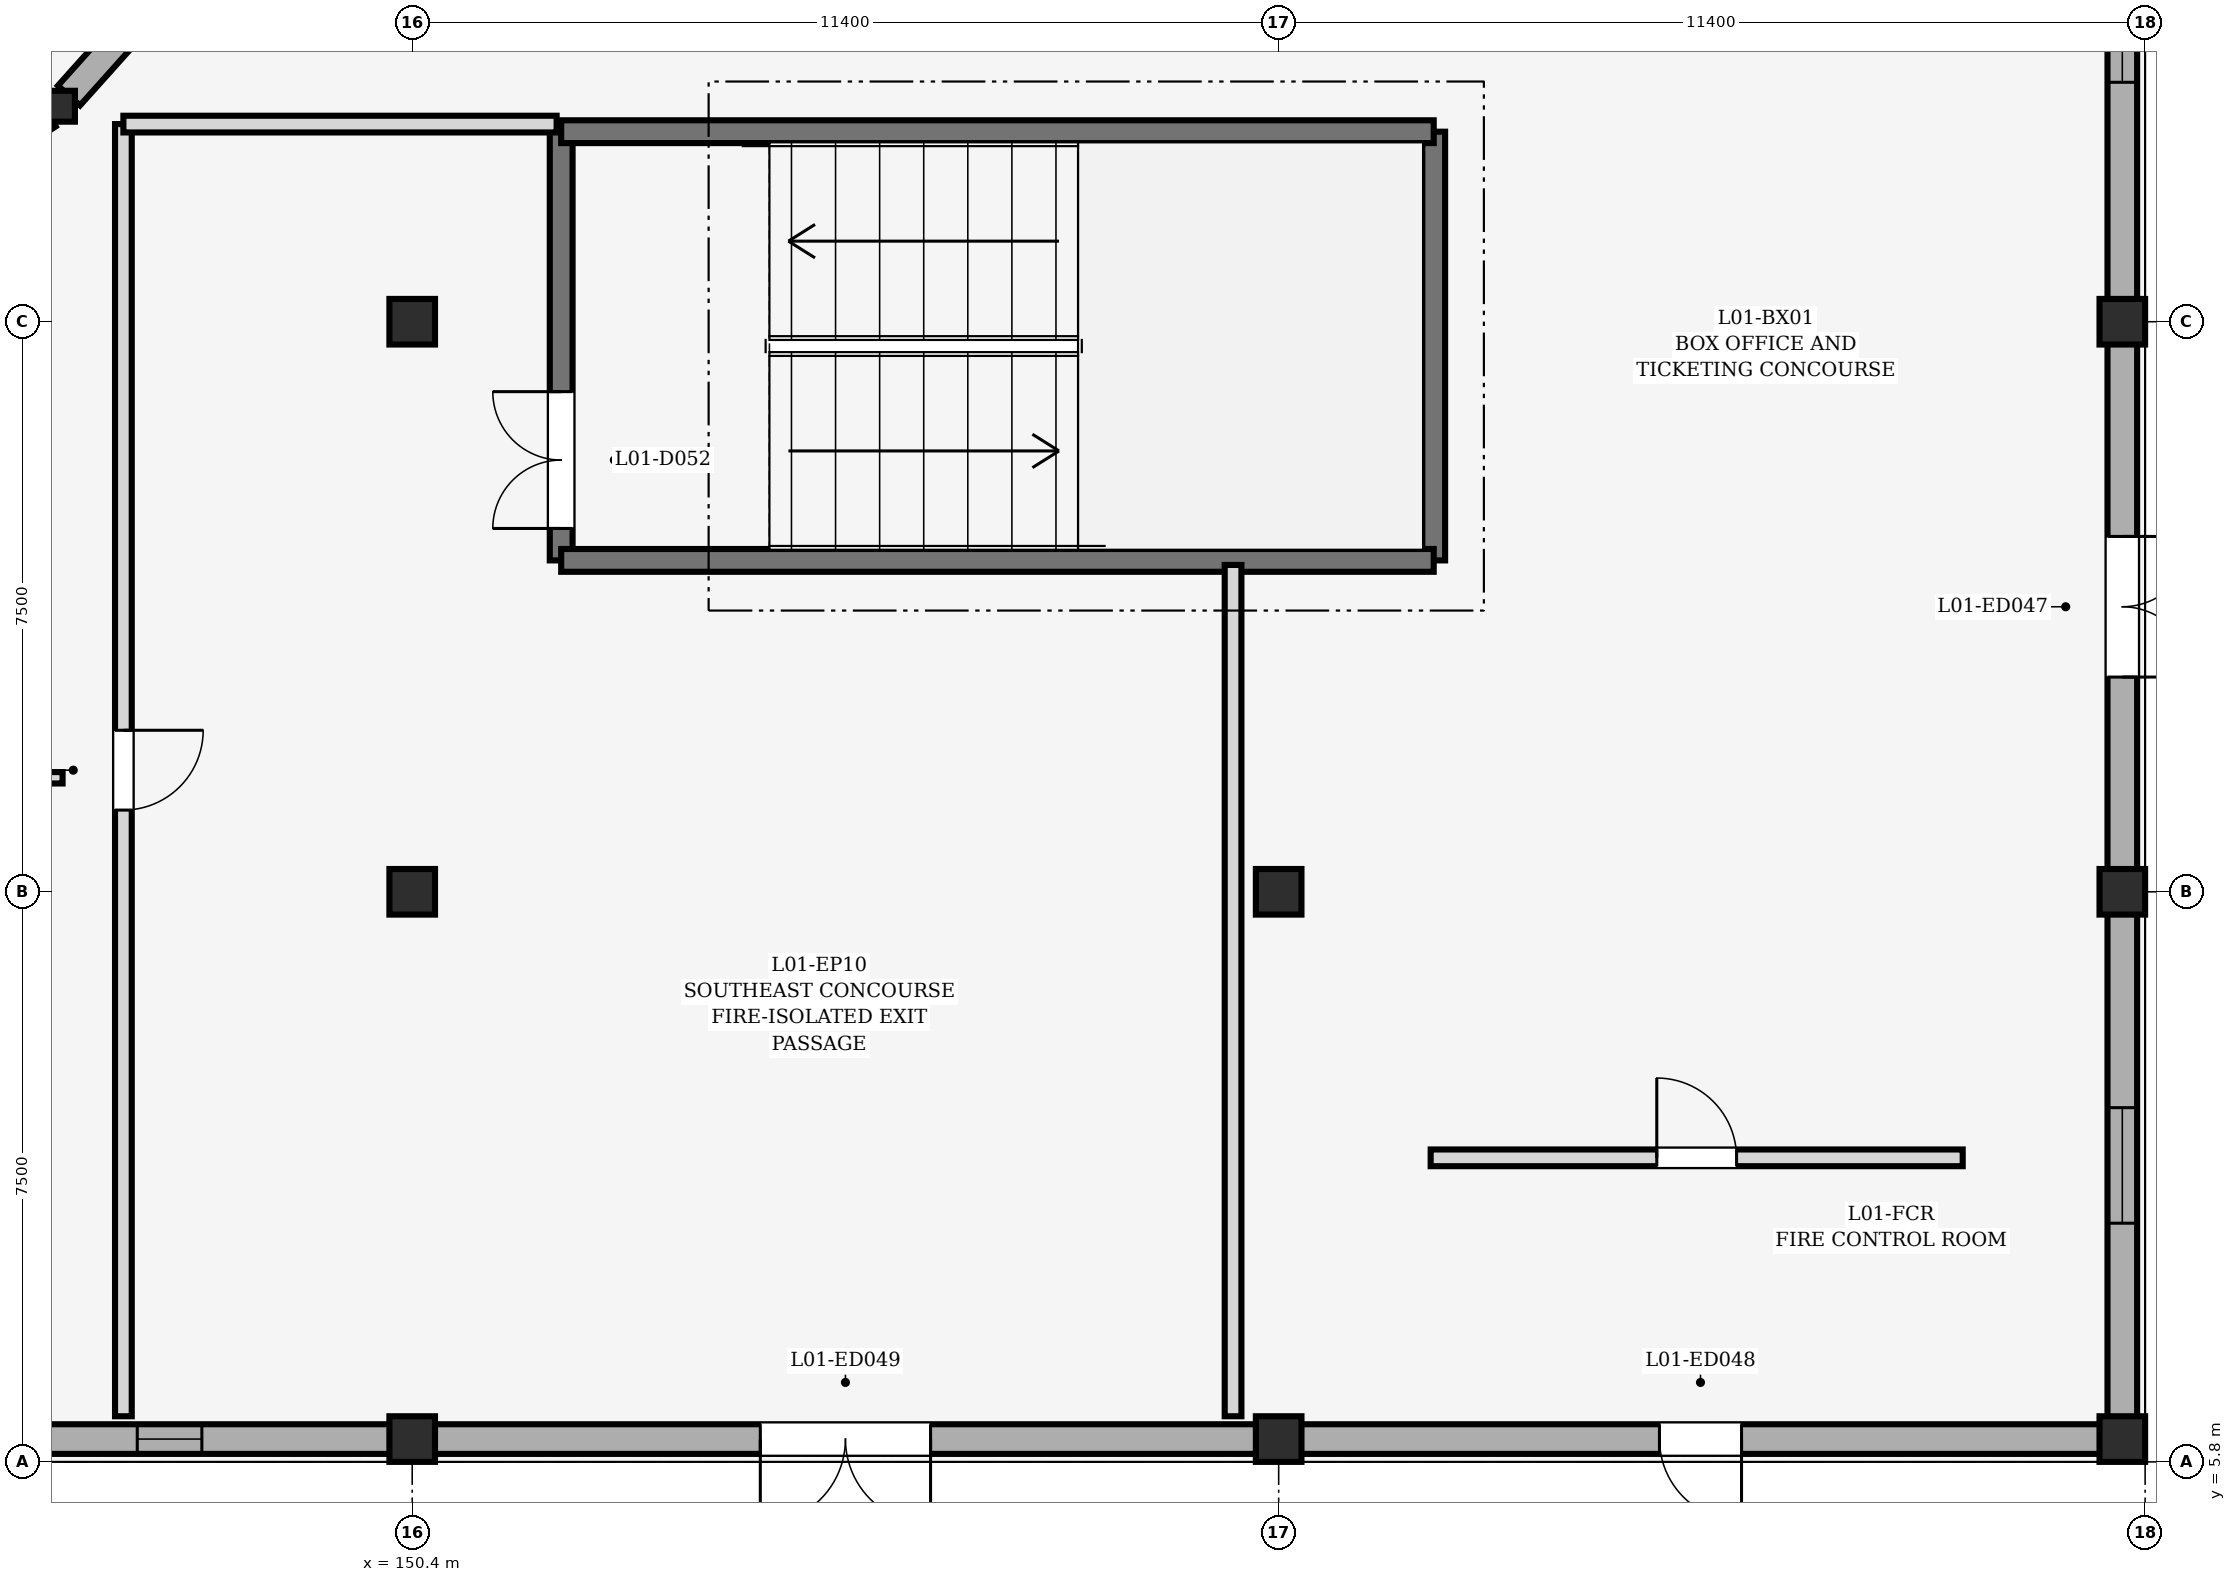
"""IFC4 building model, lengths in metres.
Left out: names, types, materials, properties, quantities, classifications, styles, units other than length and angle.
Written with IfcOpenShell. Run it as: python <this file> out.ifc"""

import sys

from ifc_helpers import new_model, si_unit, direction, frame, frame_2d, origin, origin_2d, place, context, subcontext, project, spatial, rectangle, hollow_circle, extrude, element, fill, save


model = new_model("IFC4")
c1 = context("Model", 3, precision=1e-05, world=origin(), true_north=direction((0.0, 1.0)))
c2 = subcontext(c1, "Body", "Model", "MODEL_VIEW")
j1 = project(units=[si_unit("LENGTHUNIT", "METRE"), si_unit("PLANEANGLEUNIT", "RADIAN")], contexts=[c1])
p1 = place(None, origin())
s1 = spatial("IfcSite", under=j1, at=p1, CompositionType="ELEMENT")
p2 = place(p1, origin())
s2 = spatial("IfcBuilding", under=s1, at=p2, CompositionType="ELEMENT")
p3 = place(p2, origin())
s3 = spatial("IfcBuildingStorey", under=s2, at=p3, CompositionType="ELEMENT", Elevation=0.0)
p4 = place(p3, frame((145.759, 23.635, 0.0), z_axis=(0.0, 0.0, 1.0), x_axis=(1.0, 0.0, 0.0)))
e1 = element("IfcColumn", 1, at=p4, inside=s3, PredefinedType="COLUMN", context=c2, shape_type="SweptSolid", body=[
    extrude(hollow_circle(Radius=0.203, WallThickness=0.016, at=origin_2d()), origin(), (0.0, 0.0, 1.0), 5.4),
])
for number, where, z_axis, x_axis in (
    (2, (150.4, 6.1, 0.0), (0.0, 0.0, 1.0), (1.0, 0.0, 0.0)),
    (3, (150.4, 13.3, 0.0), (0.0, 0.0, 1.0), (1.0, 0.0, 0.0)),
    (4, (150.4, 20.8, 0.0), (0.0, 0.0, 1.0), (1.0, 0.0, 0.0)),
    (5, (161.8, 6.1, 0.0), (0.0, 0.0, 1.0), (1.0, 0.0, 0.0)),
    (6, (161.8, 13.3, 0.0), (0.0, 0.0, 1.0), (1.0, 0.0, 0.0)),
    (7, (172.9, 6.1, 0.0), (0.0, 0.0, 1.0), (1.0, 0.0, 0.0)),
    (8, (172.9, 13.3, 0.0), (0.0, 0.0, 1.0), (1.0, 0.0, 0.0)),
    (9, (172.9, 20.8, 0.0), (0.0, 0.0, 1.0), (1.0, 0.0, 0.0)),
):
    element("IfcColumn", number, at=place(p3, frame(where, z_axis=z_axis, x_axis=x_axis)), inside=s3, PredefinedType="COLUMN", context=c2, shape_type="SweptSolid", body=[
        extrude(rectangle(XDim=0.6, YDim=0.6, at=origin_2d()), origin(), (0.0, 0.0, 1.0), 5.4),
    ])
p5 = place(p3, frame((138.957, 19.162, 0.0), z_axis=(0.0, 0.0, 1.0), x_axis=(0.835481991605, 0.549517826556, 0.0)))
e10 = element("IfcWall", 10, at=p5, inside=s3, PredefinedType="STANDARD", context=c2, shape_type="SweptSolid", body=[
    extrude(rectangle(XDim=7.953, YDim=0.39, at=frame_2d((3.976, 0.0))), origin(), (0.0, 0.0, 1.0), 4.487),
])
p6 = place(p5, frame((2.856, 0.0, 0.0)))
e11 = element("IfcOpeningElement", 11, at=p6, cuts=e10, PredefinedType="OPENING", context=c2, shape_type="SweptSolid", body=[
    extrude(rectangle(XDim=2.24, YDim=2.35, at=frame_2d((1.12, 1.175))), frame((0.0, 0.207, 0.0), z_axis=(0.0, -1.0, 0.0), x_axis=(1.0, 0.0, 0.0)), (0.0, 0.0, 1.0), 0.414),
])
p7 = place(p3, frame((145.884, 23.775, 0.0), z_axis=(0.0, 0.0, 1.0), x_axis=(0.666987529742, 0.745068879479, 0.0)))
e12 = element("IfcWall", 12, at=p7, inside=s3, PredefinedType="STANDARD", context=c2, shape_type="SweptSolid", body=[
    extrude(rectangle(XDim=7.629, YDim=0.39, at=frame_2d((3.814, 0.0))), origin(), (0.0, 0.0, 1.0), 4.487),
])
p8 = place(p7, frame((2.695, 0.0, 0.0)))
e13 = element("IfcOpeningElement", 13, at=p8, cuts=e12, PredefinedType="OPENING", context=c2, shape_type="SweptSolid", body=[
    extrude(rectangle(XDim=2.24, YDim=2.35, at=frame_2d((1.12, 1.175))), frame((0.0, 0.207, 0.0), z_axis=(0.0, -1.0, 0.0), x_axis=(1.0, 0.0, 0.0)), (0.0, 0.0, 1.0), 0.414),
])
p9 = place(p3, frame((172.9, 13.015, 0.0), z_axis=(0.0, 0.0, 1.0), x_axis=(0.0, -1.0, 0.0)))
e14 = element("IfcWall", 14, at=p9, inside=s3, PredefinedType="STANDARD", context=c2, shape_type="SweptSolid", body=[
    extrude(rectangle(XDim=6.63, YDim=0.39, at=frame_2d((3.315, 0.0))), origin(), (0.0, 0.0, 1.0), 4.427),
])
p10 = place(p9, frame((2.555, 0.0, 0.85)))
e15 = element("IfcOpeningElement", 15, at=p10, cuts=e14, PredefinedType="OPENING", context=c2, shape_type="SweptSolid", body=[
    extrude(rectangle(XDim=1.52, YDim=1.75, at=frame_2d((0.76, 0.875))), frame((0.0, 0.207, 0.0), z_axis=(0.0, -1.0, 0.0), x_axis=(1.0, 0.0, 0.0)), (0.0, 0.0, 1.0), 0.414),
])
p11 = place(p3, frame((172.9, 20.515, 0.0), z_axis=(0.0, 0.0, 1.0), x_axis=(0.0, -1.0, 0.0)))
e16 = element("IfcWall", 16, at=p11, inside=s3, PredefinedType="STANDARD", context=c2, shape_type="SweptSolid", body=[
    extrude(rectangle(XDim=6.93, YDim=0.39, at=frame_2d((3.465, 0.0))), origin(), (0.0, 0.0, 1.0), 4.525),
])
p12 = place(p11, frame((2.54, 0.0, 0.0)))
e17 = element("IfcOpeningElement", 17, at=p12, cuts=e16, PredefinedType="OPENING", context=c2, shape_type="SweptSolid", body=[
    extrude(rectangle(XDim=1.85, YDim=2.25, at=frame_2d((0.925, 1.125))), frame((0.0, 0.207, 0.0), z_axis=(0.0, -1.0, 0.0), x_axis=(1.0, 0.0, 0.0)), (0.0, 0.0, 1.0), 0.414),
])
p13 = place(p3, frame((172.9, 27.715, 0.0), z_axis=(0.0, 0.0, 1.0), x_axis=(0.0, -1.0, 0.0)))
e18 = element("IfcWall", 18, at=p13, inside=s3, PredefinedType="STANDARD", context=c2, shape_type="SweptSolid", body=[
    extrude(rectangle(XDim=6.63, YDim=0.39, at=frame_2d((3.315, 0.0))), origin(), (0.0, 0.0, 1.0), 4.599),
])
p14 = place(p13, frame((2.865, 0.0, 0.85)))
e19 = element("IfcOpeningElement", 19, at=p14, cuts=e18, PredefinedType="OPENING", context=c2, shape_type="SweptSolid", body=[
    extrude(rectangle(XDim=0.9, YDim=1.5, at=frame_2d((0.45, 0.75))), frame((0.0, 0.207, 0.0), z_axis=(0.0, -1.0, 0.0), x_axis=(1.0, 0.0, 0.0)), (0.0, 0.0, 1.0), 0.414),
])
p15 = place(p3, frame((172.615, 6.1, 0.0), z_axis=(0.0, 0.0, 1.0), x_axis=(-1.0, 0.0, 0.0)))
e20 = element("IfcWall", 20, at=p15, inside=s3, PredefinedType="STANDARD", context=c2, shape_type="SweptSolid", body=[
    extrude(rectangle(XDim=10.53, YDim=0.39, at=frame_2d((5.265, 0.0))), origin(), (0.0, 0.0, 1.0), 4.427),
])
p16 = place(p15, frame((4.725, 0.0, 0.0)))
e21 = element("IfcOpeningElement", 21, at=p16, cuts=e20, PredefinedType="OPENING", context=c2, shape_type="SweptSolid", body=[
    extrude(rectangle(XDim=1.08, YDim=2.18, at=frame_2d((0.54, 1.09))), frame((0.0, 0.207, 0.0), z_axis=(0.0, -1.0, 0.0), x_axis=(1.0, 0.0, 0.0)), (0.0, 0.0, 1.0), 0.414),
])
p17 = place(p3, frame((161.515, 6.1, 0.0), z_axis=(0.0, 0.0, 1.0), x_axis=(-1.0, 0.0, 0.0)))
e22 = element("IfcWall", 22, at=p17, inside=s3, PredefinedType="STANDARD", context=c2, shape_type="SweptSolid", body=[
    extrude(rectangle(XDim=10.83, YDim=0.39, at=frame_2d((5.415, 0.0))), origin(), (0.0, 0.0, 1.0), 4.427),
])
p18 = place(p17, frame((4.295, 0.0, 0.0)))
e23 = element("IfcOpeningElement", 23, at=p18, cuts=e22, PredefinedType="OPENING", context=c2, shape_type="SweptSolid", body=[
    extrude(rectangle(XDim=2.24, YDim=2.35, at=frame_2d((1.12, 1.175))), frame((0.0, 0.207, 0.0), z_axis=(0.0, -1.0, 0.0), x_axis=(1.0, 0.0, 0.0)), (0.0, 0.0, 1.0), 0.414),
])
p19 = place(p3, frame((150.115, 6.1, 0.0), z_axis=(0.0, 0.0, 1.0), x_axis=(-1.0, 0.0, 0.0)))
e24 = element("IfcWall", 24, at=p19, inside=s3, PredefinedType="STANDARD", context=c2, shape_type="SweptSolid", body=[
    extrude(rectangle(XDim=10.23, YDim=0.39, at=frame_2d((5.115, 0.0))), origin(), (0.0, 0.0, 1.0), 4.427),
])
p20 = place(p19, frame((2.482, 0.0, 0.85)))
e25 = element("IfcOpeningElement", 25, at=p20, cuts=e24, PredefinedType="OPENING", context=c2, shape_type="SweptSolid", body=[
    extrude(rectangle(XDim=0.85, YDim=2.2, at=frame_2d((0.425, 1.1))), frame((0.0, 0.207, 0.0), z_axis=(0.0, -1.0, 0.0), x_axis=(1.0, 0.0, 0.0)), (0.0, 0.0, 1.0), 0.414),
])
p21 = place(p19, frame((6.897, 0.0, 0.85)))
e26 = element("IfcOpeningElement", 26, at=p21, cuts=e24, PredefinedType="OPENING", context=c2, shape_type="SweptSolid", body=[
    extrude(rectangle(XDim=0.85, YDim=2.2, at=frame_2d((0.425, 1.1))), frame((0.0, 0.207, 0.0), z_axis=(0.0, -1.0, 0.0), x_axis=(1.0, 0.0, 0.0)), (0.0, 0.0, 1.0), 0.414),
])
p22 = place(p3, frame((152.36, 17.66, 0.0), z_axis=(0.0, 0.0, 1.0), x_axis=(0.0, 1.0, 0.0)))
e27 = element("IfcWall", 27, at=p22, inside=s3, PredefinedType="SHEAR", context=c2, shape_type="SweptSolid", body=[
    extrude(rectangle(XDim=5.64, YDim=0.3, at=frame_2d((2.82, 0.0))), origin(), (0.0, 0.0, 1.0), 5.14),
])
p23 = place(p22, frame((0.42, 0.0, 0.0)))
e28 = element("IfcOpeningElement", 28, at=p23, cuts=e27, PredefinedType="OPENING", context=c2, shape_type="SweptSolid", body=[
    extrude(rectangle(XDim=1.8, YDim=2.2, at=frame_2d((0.9, 1.1))), frame((0.0, 0.162, 0.0), z_axis=(0.0, -1.0, 0.0), x_axis=(1.0, 0.0, 0.0)), (0.0, 0.0, 1.0), 0.324),
])
p24 = place(p3, frame((163.84, 23.3, 0.0), z_axis=(0.0, 0.0, 1.0), x_axis=(0.0, -1.0, 0.0)))
e29 = element("IfcWall", 29, at=p24, inside=s3, PredefinedType="SHEAR", context=c2, shape_type="SweptSolid", body=[
    extrude(rectangle(XDim=5.64, YDim=0.3, at=frame_2d((2.82, 0.0))), origin(), (0.0, 0.0, 1.0), 5.14),
])
for number, where, z_axis, x_axis in (
    (30, (163.84, 17.66, 0.0), (0.0, 0.0, 1.0), (-1.0, 0.0, 0.0)),
    (31, (152.36, 23.3, 0.0), (0.0, 0.0, 1.0), (1.0, 0.0, 0.0)),
):
    element("IfcWall", number, at=place(p3, frame(where, z_axis=z_axis, x_axis=x_axis)), inside=s3, PredefinedType="SHEAR", context=c2, shape_type="SweptSolid", body=[
        extrude(rectangle(XDim=11.48, YDim=0.3, at=frame_2d((5.74, 0.0))), origin(), (0.0, 0.0, 1.0), 5.14),
    ])
p25 = place(p3, frame((146.6, 23.4, 0.0), z_axis=(0.0, 0.0, 1.0), x_axis=(0.0, -1.0, 0.0)))
e32 = element("IfcWall", 32, at=p25, inside=s3, PredefinedType="SOLIDWALL", context=c2, shape_type="SweptSolid", body=[
    extrude(rectangle(XDim=17.0, YDim=0.22, at=frame_2d((8.5, 0.0))), origin(), (0.0, 0.0, 1.0), 5.125),
])
p26 = place(p25, frame((7.975, 0.0, 0.0)))
e33 = element("IfcOpeningElement", 33, at=p26, cuts=e32, PredefinedType="OPENING", context=c2, shape_type="SweptSolid", body=[
    extrude(rectangle(XDim=1.05, YDim=2.15, at=frame_2d((0.525, 1.075))), frame((0.0, 0.122, 0.0), z_axis=(0.0, -1.0, 0.0), x_axis=(1.0, 0.0, 0.0)), (0.0, 0.0, 1.0), 0.244),
])
p27 = place(p3, frame((152.3, 23.4, 0.0), z_axis=(0.0, 0.0, 1.0), x_axis=(-1.0, 0.0, 0.0)))
e34 = element("IfcWall", 34, at=p27, inside=s3, PredefinedType="SOLIDWALL", context=c2, shape_type="SweptSolid", body=[
    extrude(rectangle(XDim=5.7, YDim=0.22, at=frame_2d((2.85, 0.0))), origin(), (0.0, 0.0, 1.0), 5.125),
])
p28 = place(p3, frame((161.2, 6.4, 0.0), z_axis=(0.0, 0.0, 1.0), x_axis=(0.0, 1.0, 0.0)))
e35 = element("IfcWall", 35, at=p28, inside=s3, PredefinedType="SOLIDWALL", context=c2, shape_type="SweptSolid", body=[
    extrude(rectangle(XDim=11.2, YDim=0.22, at=frame_2d((5.6, 0.0))), origin(), (0.0, 0.0, 1.0), 5.125),
])
p29 = place(p3, frame((140.4, 14.8, 0.0), z_axis=(0.0, 0.0, 1.0), x_axis=(1.0, 0.0, 0.0)))
e36 = element("IfcWall", 36, at=p29, inside=s3, PredefinedType="PARTITIONING", context=c2, shape_type="SweptSolid", body=[
    extrude(rectangle(XDim=5.4, YDim=0.15, at=frame_2d((2.7, 0.0))), origin(), (0.0, 0.0, 1.0), 5.125),
])
p30 = place(p29, frame((1.85, 0.0, 0.0)))
e37 = element("IfcOpeningElement", 37, at=p30, cuts=e36, PredefinedType="OPENING", context=c2, shape_type="SweptSolid", body=[
    extrude(rectangle(XDim=1.7, YDim=2.2, at=frame_2d((0.85, 1.1))), frame((0.0, 0.087, 0.0), z_axis=(0.0, -1.0, 0.0), x_axis=(1.0, 0.0, 0.0)), (0.0, 0.0, 1.0), 0.174),
])
p31 = place(p3, frame((163.8, 9.8, 0.0), z_axis=(0.0, 0.0, 1.0), x_axis=(1.0, 0.0, 0.0)))
e38 = element("IfcWall", 38, at=p31, inside=s3, PredefinedType="SOLIDWALL", context=c2, shape_type="SweptSolid", body=[
    extrude(rectangle(XDim=7.0, YDim=0.22, at=frame_2d((3.5, 0.0))), origin(), (0.0, 0.0, 1.0), 4.724),
])
p32 = place(p31, frame((2.975, 0.0, 0.0)))
e39 = element("IfcOpeningElement", 39, at=p32, cuts=e38, PredefinedType="OPENING", context=c2, shape_type="SweptSolid", body=[
    extrude(rectangle(XDim=1.05, YDim=2.15, at=frame_2d((0.525, 1.075))), frame((0.0, 0.122, 0.0), z_axis=(0.0, -1.0, 0.0), x_axis=(1.0, 0.0, 0.0)), (0.0, 0.0, 1.0), 0.244),
])
p33 = place(p10, origin())
e40 = element("IfcWindow", 40, at=p33, inside=s3, PartitioningType="DOUBLE_PANEL_VERTICAL", PredefinedType="WINDOW", context=c2, shape_type="SweptSolid", body=[
    extrude(rectangle(XDim=1.52, YDim=1.75, at=frame_2d((0.76, 0.875))), frame((0.0, 0.03, 0.0), z_axis=(0.0, -1.0, 0.0), x_axis=(1.0, 0.0, 0.0)), (0.0, 0.0, 1.0), 0.06),
])
fill(e15, e40)
p34 = place(p12, origin())
e41 = element("IfcDoor", 41, at=p34, inside=s3, OperationType="DOUBLE_DOOR_SINGLE_SWING", PredefinedType="DOOR", context=c2, shape_type="SweptSolid", body=[
    extrude(rectangle(XDim=1.85, YDim=2.25, at=frame_2d((0.925, 1.125))), frame((0.0, 0.025, 0.0), z_axis=(0.0, -1.0, 0.0), x_axis=(1.0, 0.0, 0.0)), (0.0, 0.0, 1.0), 0.05),
])
fill(e17, e41)
p35 = place(p14, origin())
e42 = element("IfcWindow", 42, at=p35, inside=s3, PartitioningType="DOUBLE_PANEL_VERTICAL", PredefinedType="WINDOW", context=c2, shape_type="SweptSolid", body=[
    extrude(rectangle(XDim=0.9, YDim=1.5, at=frame_2d((0.45, 0.75))), frame((0.0, 0.03, 0.0), z_axis=(0.0, -1.0, 0.0), x_axis=(1.0, 0.0, 0.0)), (0.0, 0.0, 1.0), 0.06),
])
fill(e19, e42)
p36 = place(p16, origin())
e43 = element("IfcDoor", 43, at=p36, inside=s3, OperationType="SINGLE_SWING_LEFT", PredefinedType="DOOR", context=c2, shape_type="SweptSolid", body=[
    extrude(rectangle(XDim=1.08, YDim=2.18, at=frame_2d((0.54, 1.09))), frame((0.0, 0.025, 0.0), z_axis=(0.0, -1.0, 0.0), x_axis=(1.0, 0.0, 0.0)), (0.0, 0.0, 1.0), 0.05),
])
fill(e21, e43)
p37 = place(p18, origin())
e44 = element("IfcDoor", 44, at=p37, inside=s3, OperationType="DOUBLE_DOOR_SINGLE_SWING", PredefinedType="DOOR", context=c2, shape_type="SweptSolid", body=[
    extrude(rectangle(XDim=2.24, YDim=2.35, at=frame_2d((1.12, 1.175))), frame((0.0, 0.025, 0.0), z_axis=(0.0, -1.0, 0.0), x_axis=(1.0, 0.0, 0.0)), (0.0, 0.0, 1.0), 0.05),
])
fill(e23, e44)
p38 = place(p20, origin())
e45 = element("IfcWindow", 45, at=p38, inside=s3, PartitioningType="DOUBLE_PANEL_VERTICAL", PredefinedType="WINDOW", context=c2, shape_type="SweptSolid", body=[
    extrude(rectangle(XDim=0.85, YDim=2.2, at=frame_2d((0.425, 1.1))), frame((0.0, 0.03, 0.0), z_axis=(0.0, -1.0, 0.0), x_axis=(1.0, 0.0, 0.0)), (0.0, 0.0, 1.0), 0.06),
])
fill(e25, e45)
p39 = place(p23, origin())
e46 = element("IfcDoor", 46, at=p39, inside=s3, OperationType="DOUBLE_DOOR_SINGLE_SWING", PredefinedType="DOOR", context=c2, shape_type="SweptSolid", body=[
    extrude(rectangle(XDim=1.8, YDim=2.2, at=frame_2d((0.9, 1.1))), frame((0.0, 0.025, 0.0), z_axis=(0.0, -1.0, 0.0), x_axis=(1.0, 0.0, 0.0)), (0.0, 0.0, 1.0), 0.05),
])
fill(e28, e46)
p40 = place(p26, origin())
e47 = element("IfcDoor", 47, at=p40, inside=s3, OperationType="SINGLE_SWING_LEFT", PredefinedType="DOOR", context=c2, shape_type="SweptSolid", body=[
    extrude(rectangle(XDim=1.05, YDim=2.15, at=frame_2d((0.525, 1.075))), frame((0.0, 0.025, 0.0), z_axis=(0.0, -1.0, 0.0), x_axis=(1.0, 0.0, 0.0)), (0.0, 0.0, 1.0), 0.05),
])
fill(e33, e47)
p41 = place(p32, origin())
e48 = element("IfcDoor", 48, at=p41, inside=s3, OperationType="SINGLE_SWING_LEFT", PredefinedType="DOOR", context=c2, shape_type="SweptSolid", body=[
    extrude(rectangle(XDim=1.05, YDim=2.15, at=frame_2d((0.525, 1.075))), frame((0.0, 0.025, 0.0), z_axis=(0.0, -1.0, 0.0), x_axis=(1.0, 0.0, 0.0)), (0.0, 0.0, 1.0), 0.05),
])
fill(e39, e48)
save(model, sys.argv[1])
